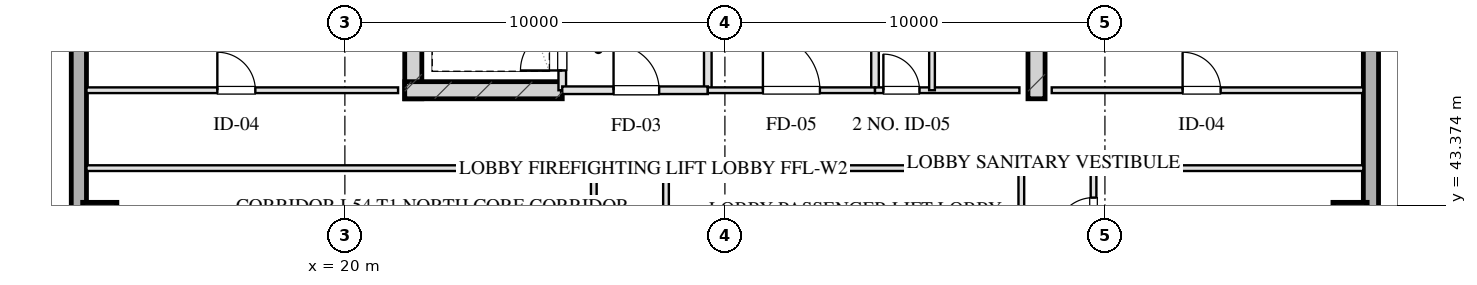
"""IFC4 building model, lengths in metres.
Left out: names, types, materials, properties, quantities, classifications, styles, units other than length and angle.
Written with IfcOpenShell. Run it as: python <this file> out.ifc"""

import sys

from ifc_helpers import new_model, si_unit, direction, frame, frame_2d, origin, origin_2d, place, context, subcontext, project, spatial, rectangle, hollow_rectangle, extrude, element, fill, save


model = new_model("IFC4")
c1 = context("Model", 3, precision=1e-05, world=origin(), true_north=direction((0.0, 1.0)))
c2 = subcontext(c1, "Body", "Model", "MODEL_VIEW")
j1 = project(units=[si_unit("LENGTHUNIT", "METRE"), si_unit("PLANEANGLEUNIT", "RADIAN")], contexts=[c1])
p1 = place(None, origin())
s1 = spatial("IfcSite", under=j1, at=p1, CompositionType="ELEMENT")
p2 = place(p1, origin())
s2 = spatial("IfcBuilding", under=s1, at=p2, CompositionType="ELEMENT")
p3 = place(p2, frame((0.0, 0.0, 202.4)))
s3 = spatial("IfcBuildingStorey", under=s2, at=p3, CompositionType="ELEMENT", Elevation=202.4)
for number, where, z_axis, x_axis in (
    (1, (21.8, 46.175, 0.0), (0.0, 0.0, 1.0), (0.0, 1.0, 0.0)),
    (2, (38.2, 46.175, 0.0), (0.0, 0.0, 1.0), (0.0, 1.0, 0.0)),
):
    element("IfcWall", number, at=place(p3, frame(where, z_axis=z_axis, x_axis=x_axis)), inside=s3, PredefinedType="SHEAR", context=c2, shape_type="SweptSolid", body=[
        extrude(rectangle(XDim=9.33, YDim=0.45, at=frame_2d((4.665, 0.0))), origin(), (0.0, 0.0, 1.0), 3.45),
    ])
p4 = place(p3, frame((21.575, 46.4, 0.0), z_axis=(0.0, 0.0, 1.0), x_axis=(1.0, 0.0, 0.0)))
e3 = element("IfcWall", 3, at=p4, inside=s3, PredefinedType="SHEAR", context=c2, shape_type="SweptSolid", body=[
    extrude(rectangle(XDim=4.145, YDim=0.45, at=frame_2d((2.073, 0.0))), origin(), (0.0, 0.0, 1.0), 3.45),
])
for number, where, z_axis, x_axis in (
    (4, (13.55, 43.0, 0.0), (0.0, 0.0, 1.0), (1.0, 0.0, 0.0)),
    (5, (46.45, 43.0, 0.0), (0.0, 0.0, 1.0), (1.0, 0.0, 0.0)),
):
    element("IfcColumn", number, at=place(p3, frame(where, z_axis=z_axis, x_axis=x_axis)), inside=s3, PredefinedType="COLUMN", context=c2, shape_type="SweptSolid", body=[
        extrude(hollow_rectangle(XDim=0.9, YDim=0.9, WallThickness=0.032, at=origin_2d()), origin(), (0.0, 0.0, 1.0), 3.451),
    ])
p5 = place(p3, frame((13.0, 10.8, 0.0), z_axis=(0.0, 0.0, 1.0), x_axis=(0.0, 1.0, 0.0)))
e6 = element("IfcWall", 6, at=p5, inside=s3, PredefinedType="SOLIDWALL", context=c2, shape_type="SweptSolid", body=[
    extrude(rectangle(XDim=46.4, YDim=0.4, at=frame_2d((23.2, 0.0))), origin(), (0.0, 0.0, 1.0), 2.61),
])
p6 = place(p5, frame((15.75, 0.0, 0.75)))
e7 = element("IfcOpeningElement", 7, at=p6, cuts=e6, PredefinedType="OPENING", context=c2, shape_type="SweptSolid", body=[
    extrude(rectangle(XDim=2.1, YDim=1.46, at=frame_2d((1.05, 0.73))), frame((0.0, 0.21, 0.0), z_axis=(0.0, -1.0, 0.0), x_axis=(1.0, 0.0, 0.0)), (0.0, 0.0, 1.0), 0.42),
])
p7 = place(p5, frame((19.55, 0.0, 0.75)))
e8 = element("IfcOpeningElement", 8, at=p7, cuts=e6, PredefinedType="OPENING", context=c2, shape_type="SweptSolid", body=[
    extrude(rectangle(XDim=2.1, YDim=1.46, at=frame_2d((1.05, 0.73))), frame((0.0, 0.21, 0.0), z_axis=(0.0, -1.0, 0.0), x_axis=(1.0, 0.0, 0.0)), (0.0, 0.0, 1.0), 0.42),
])
p8 = place(p5, frame((24.75, 0.0, 0.75)))
e9 = element("IfcOpeningElement", 9, at=p8, cuts=e6, PredefinedType="OPENING", context=c2, shape_type="SweptSolid", body=[
    extrude(rectangle(XDim=2.1, YDim=1.46, at=frame_2d((1.05, 0.73))), frame((0.0, 0.21, 0.0), z_axis=(0.0, -1.0, 0.0), x_axis=(1.0, 0.0, 0.0)), (0.0, 0.0, 1.0), 0.42),
])
p9 = place(p5, frame((28.55, 0.0, 0.75)))
e10 = element("IfcOpeningElement", 10, at=p9, cuts=e6, PredefinedType="OPENING", context=c2, shape_type="SweptSolid", body=[
    extrude(rectangle(XDim=2.1, YDim=1.46, at=frame_2d((1.05, 0.73))), frame((0.0, 0.21, 0.0), z_axis=(0.0, -1.0, 0.0), x_axis=(1.0, 0.0, 0.0)), (0.0, 0.0, 1.0), 0.42),
])
p10 = place(p3, frame((47.0, 57.2, 0.0), z_axis=(0.0, 0.0, 1.0), x_axis=(0.0, -1.0, 0.0)))
e11 = element("IfcWall", 11, at=p10, inside=s3, PredefinedType="SOLIDWALL", context=c2, shape_type="SweptSolid", body=[
    extrude(rectangle(XDim=46.4, YDim=0.4, at=frame_2d((23.2, 0.0))), origin(), (0.0, 0.0, 1.0), 2.61),
])
p11 = place(p10, frame((28.55, 0.0, 0.75)))
e12 = element("IfcOpeningElement", 12, at=p11, cuts=e11, PredefinedType="OPENING", context=c2, shape_type="SweptSolid", body=[
    extrude(rectangle(XDim=2.1, YDim=1.46, at=frame_2d((1.05, 0.73))), frame((0.0, 0.21, 0.0), z_axis=(0.0, -1.0, 0.0), x_axis=(1.0, 0.0, 0.0)), (0.0, 0.0, 1.0), 0.42),
])
p12 = place(p10, frame((24.75, 0.0, 0.75)))
e13 = element("IfcOpeningElement", 13, at=p12, cuts=e11, PredefinedType="OPENING", context=c2, shape_type="SweptSolid", body=[
    extrude(rectangle(XDim=2.1, YDim=1.46, at=frame_2d((1.05, 0.73))), frame((0.0, 0.21, 0.0), z_axis=(0.0, -1.0, 0.0), x_axis=(1.0, 0.0, 0.0)), (0.0, 0.0, 1.0), 0.42),
])
p13 = place(p10, frame((19.55, 0.0, 0.75)))
e14 = element("IfcOpeningElement", 14, at=p13, cuts=e11, PredefinedType="OPENING", context=c2, shape_type="SweptSolid", body=[
    extrude(rectangle(XDim=2.1, YDim=1.46, at=frame_2d((1.05, 0.73))), frame((0.0, 0.21, 0.0), z_axis=(0.0, -1.0, 0.0), x_axis=(1.0, 0.0, 0.0)), (0.0, 0.0, 1.0), 0.42),
])
p14 = place(p10, frame((15.75, 0.0, 0.75)))
e15 = element("IfcOpeningElement", 15, at=p14, cuts=e11, PredefinedType="OPENING", context=c2, shape_type="SweptSolid", body=[
    extrude(rectangle(XDim=2.1, YDim=1.46, at=frame_2d((1.05, 0.73))), frame((0.0, 0.21, 0.0), z_axis=(0.0, -1.0, 0.0), x_axis=(1.0, 0.0, 0.0)), (0.0, 0.0, 1.0), 0.42),
])
p15 = place(p3, frame((25.72, 46.4, 0.0), z_axis=(0.0, 0.0, 1.0), x_axis=(0.0, 1.0, 0.0)))
e16 = element("IfcWall", 16, at=p15, inside=s3, PredefinedType="PARTITIONING", context=c2, shape_type="SweptSolid", body=[
    extrude(rectangle(XDim=1.9, YDim=0.2, at=frame_2d((0.95, 0.0))), origin(), (0.0, 0.0, 1.0), 3.175),
])
p16 = place(p15, frame((0.52, 0.0, 0.0)))
e17 = element("IfcOpeningElement", 17, at=p16, cuts=e16, PredefinedType="OPENING", context=c2, shape_type="SweptSolid", body=[
    extrude(rectangle(XDim=1.1, YDim=2.05, at=frame_2d((0.55, 1.025))), frame((0.0, 0.11, 0.0), z_axis=(0.0, -1.0, 0.0), x_axis=(1.0, 0.0, 0.0)), (0.0, 0.0, 1.0), 0.22),
])
p17 = place(p3, frame((29.55, 46.4, 0.0), z_axis=(0.0, 0.0, 1.0), x_axis=(0.0, 1.0, 0.0)))
e18 = element("IfcWall", 18, at=p17, inside=s3, PredefinedType="PARTITIONING", context=c2, shape_type="SweptSolid", body=[
    extrude(rectangle(XDim=8.43, YDim=0.2, at=frame_2d((4.215, 0.0))), origin(), (0.0, 0.0, 1.0), 3.175),
])
p18 = place(p3, frame((25.72, 46.4, 0.0), z_axis=(0.0, 0.0, 1.0), x_axis=(1.0, 0.0, 0.0)))
e19 = element("IfcWall", 19, at=p18, inside=s3, PredefinedType="PARTITIONING", context=c2, shape_type="SweptSolid", body=[
    extrude(rectangle(XDim=3.83, YDim=0.2, at=frame_2d((1.915, 0.0))), origin(), (0.0, 0.0, 1.0), 3.175),
])
p19 = place(p18, frame((1.35, 0.0, 0.0)))
e20 = element("IfcOpeningElement", 20, at=p19, cuts=e19, PredefinedType="OPENING", context=c2, shape_type="SweptSolid", body=[
    extrude(rectangle(XDim=1.2, YDim=2.05, at=frame_2d((0.6, 1.025))), frame((0.0, 0.11, 0.0), z_axis=(0.0, -1.0, 0.0), x_axis=(1.0, 0.0, 0.0)), (0.0, 0.0, 1.0), 0.22),
])
p20 = place(p3, frame((33.95, 46.4, 0.0), z_axis=(0.0, 0.0, 1.0), x_axis=(0.0, 1.0, 0.0)))
e21 = element("IfcWall", 21, at=p20, inside=s3, PredefinedType="PARTITIONING", context=c2, shape_type="SweptSolid", body=[
    extrude(rectangle(XDim=8.43, YDim=0.2, at=frame_2d((4.215, 0.0))), origin(), (0.0, 0.0, 1.0), 3.175),
])
p21 = place(p3, frame((29.55, 46.4, 0.0), z_axis=(0.0, 0.0, 1.0), x_axis=(1.0, 0.0, 0.0)))
e22 = element("IfcWall", 22, at=p21, inside=s3, PredefinedType="PARTITIONING", context=c2, shape_type="SweptSolid", body=[
    extrude(rectangle(XDim=4.4, YDim=0.15, at=frame_2d((2.2, 0.0))), origin(), (0.0, 0.0, 1.0), 3.175),
])
p22 = place(p21, frame((1.45, 0.0, 0.0)))
e23 = element("IfcOpeningElement", 23, at=p22, cuts=e22, PredefinedType="OPENING", context=c2, shape_type="SweptSolid", body=[
    extrude(rectangle(XDim=1.5, YDim=2.05, at=frame_2d((0.75, 1.025))), frame((0.0, 0.085, 0.0), z_axis=(0.0, -1.0, 0.0), x_axis=(1.0, 0.0, 0.0)), (0.0, 0.0, 1.0), 0.17),
])
p23 = place(p3, frame((33.95, 46.4, 0.0), z_axis=(0.0, 0.0, 1.0), x_axis=(1.0, 0.0, 0.0)))
e24 = element("IfcWall", 24, at=p23, inside=s3, PredefinedType="PARTITIONING", context=c2, shape_type="SweptSolid", body=[
    extrude(rectangle(XDim=3.8, YDim=0.15, at=frame_2d((1.9, 0.0))), origin(), (0.0, 0.0, 1.0), 3.175),
])
p24 = place(p23, frame((0.22, 0.0, 0.0)))
e25 = element("IfcOpeningElement", 25, at=p24, cuts=e24, PredefinedType="OPENING", context=c2, shape_type="SweptSolid", body=[
    extrude(rectangle(XDim=0.95, YDim=2.05, at=frame_2d((0.475, 1.025))), frame((0.0, 0.085, 0.0), z_axis=(0.0, -1.0, 0.0), x_axis=(1.0, 0.0, 0.0)), (0.0, 0.0, 1.0), 0.17),
])
p25 = place(p3, frame((35.45, 46.4, 0.0), z_axis=(0.0, 0.0, 1.0), x_axis=(0.0, 1.0, 0.0)))
e26 = element("IfcWall", 26, at=p25, inside=s3, PredefinedType="PARTITIONING", context=c2, shape_type="SweptSolid", body=[
    extrude(rectangle(XDim=8.43, YDim=0.15, at=frame_2d((4.215, 0.0))), origin(), (0.0, 0.0, 1.0), 2.765),
])
p26 = place(p25, frame((2.55, 0.0, 0.0)))
e27 = element("IfcOpeningElement", 27, at=p26, cuts=e26, PredefinedType="OPENING", context=c2, shape_type="SweptSolid", body=[
    extrude(rectangle(XDim=0.95, YDim=2.05, at=frame_2d((0.475, 1.025))), frame((0.0, 0.085, 0.0), z_axis=(0.0, -1.0, 0.0), x_axis=(1.0, 0.0, 0.0)), (0.0, 0.0, 1.0), 0.17),
])
p27 = place(p25, frame((4.7, 0.0, 0.0)))
e28 = element("IfcOpeningElement", 28, at=p27, cuts=e26, PredefinedType="OPENING", context=c2, shape_type="SweptSolid", body=[
    extrude(rectangle(XDim=0.9, YDim=2.05, at=frame_2d((0.45, 1.025))), frame((0.0, 0.085, 0.0), z_axis=(0.0, -1.0, 0.0), x_axis=(1.0, 0.0, 0.0)), (0.0, 0.0, 1.0), 0.17),
])
p28 = place(p25, frame((6.8, 0.0, 0.0)))
e29 = element("IfcOpeningElement", 29, at=p28, cuts=e26, PredefinedType="OPENING", context=c2, shape_type="SweptSolid", body=[
    extrude(rectangle(XDim=0.9, YDim=2.05, at=frame_2d((0.45, 1.025))), frame((0.0, 0.085, 0.0), z_axis=(0.0, -1.0, 0.0), x_axis=(1.0, 0.0, 0.0)), (0.0, 0.0, 1.0), 0.17),
])
p29 = place(p3, frame((13.2, 46.4, 0.0), z_axis=(0.0, 0.0, 1.0), x_axis=(1.0, 0.0, 0.0)))
e30 = element("IfcWall", 30, at=p29, inside=s3, PredefinedType="PARTITIONING", context=c2, shape_type="SweptSolid", body=[
    extrude(rectangle(XDim=8.2, YDim=0.15, at=frame_2d((4.1, 0.0))), origin(), (0.0, 0.0, 1.0), 3.175),
])
p30 = place(p29, frame((3.444, 0.0, 0.0)))
e31 = element("IfcOpeningElement", 31, at=p30, cuts=e30, PredefinedType="OPENING", context=c2, shape_type="SweptSolid", body=[
    extrude(rectangle(XDim=1.0, YDim=2.05, at=frame_2d((0.5, 1.025))), frame((0.0, 0.085, 0.0), z_axis=(0.0, -1.0, 0.0), x_axis=(1.0, 0.0, 0.0)), (0.0, 0.0, 1.0), 0.17),
])
p31 = place(p3, frame((38.6, 46.4, 0.0), z_axis=(0.0, 0.0, 1.0), x_axis=(1.0, 0.0, 0.0)))
e32 = element("IfcWall", 32, at=p31, inside=s3, PredefinedType="PARTITIONING", context=c2, shape_type="SweptSolid", body=[
    extrude(rectangle(XDim=8.2, YDim=0.15, at=frame_2d((4.1, 0.0))), origin(), (0.0, 0.0, 1.0), 3.175),
])
p32 = place(p31, frame((3.444, 0.0, 0.0)))
e33 = element("IfcOpeningElement", 33, at=p32, cuts=e32, PredefinedType="OPENING", context=c2, shape_type="SweptSolid", body=[
    extrude(rectangle(XDim=1.0, YDim=2.05, at=frame_2d((0.5, 1.025))), frame((0.0, 0.085, 0.0), z_axis=(0.0, -1.0, 0.0), x_axis=(1.0, 0.0, 0.0)), (0.0, 0.0, 1.0), 0.17),
])
p33 = place(p3, frame((13.2, 44.35, 0.0), z_axis=(0.0, 0.0, 1.0), x_axis=(1.0, 0.0, 0.0)))
e34 = element("IfcWall", 34, at=p33, inside=s3, PredefinedType="PARTITIONING", context=c2, shape_type="SweptSolid", body=[
    extrude(rectangle(XDim=13.35, YDim=0.15, at=frame_2d((6.675, 0.0))), origin(), (0.0, 0.0, 1.0), 3.175),
])
p34 = place(p3, frame((28.45, 44.35, 0.0), z_axis=(0.0, 0.0, 1.0), x_axis=(1.0, 0.0, 0.0)))
e35 = element("IfcWall", 35, at=p34, inside=s3, PredefinedType="PARTITIONING", context=c2, shape_type="SweptSolid", body=[
    extrude(rectangle(XDim=9.35, YDim=0.15, at=frame_2d((4.675, 0.0))), origin(), (0.0, 0.0, 1.0), 3.175),
])
p35 = place(p3, frame((39.7, 44.35, 0.0), z_axis=(0.0, 0.0, 1.0), x_axis=(1.0, 0.0, 0.0)))
e36 = element("IfcWall", 36, at=p35, inside=s3, PredefinedType="PARTITIONING", context=c2, shape_type="SweptSolid", body=[
    extrude(rectangle(XDim=7.1, YDim=0.15, at=frame_2d((3.55, 0.0))), origin(), (0.0, 0.0, 1.0), 3.175),
])
p36 = place(p3, frame((26.55, 23.65, 0.0), z_axis=(0.0, 0.0, 1.0), x_axis=(0.0, 1.0, 0.0)))
e37 = element("IfcWall", 37, at=p36, inside=s3, PredefinedType="PARTITIONING", context=c2, shape_type="SweptSolid", body=[
    extrude(rectangle(XDim=20.7, YDim=0.15, at=frame_2d((10.35, 0.0))), origin(), (0.0, 0.0, 1.0), 3.175),
])
p37 = place(p36, frame((4.075, 0.0, 0.0)))
e38 = element("IfcOpeningElement", 38, at=p37, cuts=e37, PredefinedType="OPENING", context=c2, shape_type="SweptSolid", body=[
    extrude(rectangle(XDim=1.0, YDim=2.05, at=frame_2d((0.5, 1.025))), frame((0.0, 0.085, 0.0), z_axis=(0.0, -1.0, 0.0), x_axis=(1.0, 0.0, 0.0)), (0.0, 0.0, 1.0), 0.17),
])
p38 = place(p36, frame((14.425, 0.0, 0.0)))
e39 = element("IfcOpeningElement", 39, at=p38, cuts=e37, PredefinedType="OPENING", context=c2, shape_type="SweptSolid", body=[
    extrude(rectangle(XDim=1.0, YDim=2.05, at=frame_2d((0.5, 1.025))), frame((0.0, 0.085, 0.0), z_axis=(0.0, -1.0, 0.0), x_axis=(1.0, 0.0, 0.0)), (0.0, 0.0, 1.0), 0.17),
])
p39 = place(p3, frame((28.45, 23.65, 0.0), z_axis=(0.0, 0.0, 1.0), x_axis=(0.0, 1.0, 0.0)))
e40 = element("IfcWall", 40, at=p39, inside=s3, PredefinedType="PARTITIONING", context=c2, shape_type="SweptSolid", body=[
    extrude(rectangle(XDim=20.7, YDim=0.15, at=frame_2d((10.35, 0.0))), origin(), (0.0, 0.0, 1.0), 3.175),
])
p40 = place(p39, frame((9.936, 0.0, 0.0)))
e41 = element("IfcOpeningElement", 41, at=p40, cuts=e40, PredefinedType="OPENING", context=c2, shape_type="SweptSolid", body=[
    extrude(rectangle(XDim=1.1, YDim=2.05, at=frame_2d((0.55, 1.025))), frame((0.0, 0.085, 0.0), z_axis=(0.0, -1.0, 0.0), x_axis=(1.0, 0.0, 0.0)), (0.0, 0.0, 1.0), 0.17),
])
p41 = place(p3, frame((37.8, 23.65, 0.0), z_axis=(0.0, 0.0, 1.0), x_axis=(0.0, 1.0, 0.0)))
e42 = element("IfcWall", 42, at=p41, inside=s3, PredefinedType="PARTITIONING", context=c2, shape_type="SweptSolid", body=[
    extrude(rectangle(XDim=20.7, YDim=0.15, at=frame_2d((10.35, 0.0))), origin(), (0.0, 0.0, 1.0), 3.175),
])
p42 = place(p3, frame((39.7, 23.65, 0.0), z_axis=(0.0, 0.0, 1.0), x_axis=(0.0, 1.0, 0.0)))
e43 = element("IfcWall", 43, at=p42, inside=s3, PredefinedType="PARTITIONING", context=c2, shape_type="SweptSolid", body=[
    extrude(rectangle(XDim=20.7, YDim=0.15, at=frame_2d((10.35, 0.0))), origin(), (0.0, 0.0, 1.0), 3.175),
])
p43 = place(p42, frame((0.775, 0.0, 0.0)))
e44 = element("IfcOpeningElement", 44, at=p43, cuts=e43, PredefinedType="OPENING", context=c2, shape_type="SweptSolid", body=[
    extrude(rectangle(XDim=1.0, YDim=2.05, at=frame_2d((0.5, 1.025))), frame((0.0, 0.085, 0.0), z_axis=(0.0, -1.0, 0.0), x_axis=(1.0, 0.0, 0.0)), (0.0, 0.0, 1.0), 0.17),
])
p44 = place(p42, frame((3.95, 0.0, 0.0)))
e45 = element("IfcOpeningElement", 45, at=p44, cuts=e43, PredefinedType="OPENING", context=c2, shape_type="SweptSolid", body=[
    extrude(rectangle(XDim=1.05, YDim=2.05, at=frame_2d((0.525, 1.025))), frame((0.0, 0.085, 0.0), z_axis=(0.0, -1.0, 0.0), x_axis=(1.0, 0.0, 0.0)), (0.0, 0.0, 1.0), 0.17),
])
p45 = place(p42, frame((8.19, 0.0, 0.0)))
e46 = element("IfcOpeningElement", 46, at=p45, cuts=e43, PredefinedType="OPENING", context=c2, shape_type="SweptSolid", body=[
    extrude(rectangle(XDim=1.0, YDim=2.05, at=frame_2d((0.5, 1.025))), frame((0.0, 0.085, 0.0), z_axis=(0.0, -1.0, 0.0), x_axis=(1.0, 0.0, 0.0)), (0.0, 0.0, 1.0), 0.17),
])
p46 = place(p42, frame((12.373, 0.0, 0.0)))
e47 = element("IfcOpeningElement", 47, at=p46, cuts=e43, PredefinedType="OPENING", context=c2, shape_type="SweptSolid", body=[
    extrude(rectangle(XDim=1.0, YDim=2.05, at=frame_2d((0.5, 1.025))), frame((0.0, 0.085, 0.0), z_axis=(0.0, -1.0, 0.0), x_axis=(1.0, 0.0, 0.0)), (0.0, 0.0, 1.0), 0.17),
])
p47 = place(p42, frame((15.933, 0.0, 0.0)))
e48 = element("IfcOpeningElement", 48, at=p47, cuts=e43, PredefinedType="OPENING", context=c2, shape_type="SweptSolid", body=[
    extrude(rectangle(XDim=1.0, YDim=2.05, at=frame_2d((0.5, 1.025))), frame((0.0, 0.085, 0.0), z_axis=(0.0, -1.0, 0.0), x_axis=(1.0, 0.0, 0.0)), (0.0, 0.0, 1.0), 0.17),
])
p48 = place(p42, frame((18.925, 0.0, 0.0)))
e49 = element("IfcOpeningElement", 49, at=p48, cuts=e43, PredefinedType="OPENING", context=c2, shape_type="SweptSolid", body=[
    extrude(rectangle(XDim=1.0, YDim=2.05, at=frame_2d((0.5, 1.025))), frame((0.0, 0.085, 0.0), z_axis=(0.0, -1.0, 0.0), x_axis=(1.0, 0.0, 0.0)), (0.0, 0.0, 1.0), 0.17),
])
p49 = place(p16, origin())
e50 = element("IfcDoor", 50, at=p49, inside=s3, OperationType="SINGLE_SWING_LEFT", PredefinedType="DOOR", context=c2, shape_type="SweptSolid", body=[
    extrude(rectangle(XDim=1.1, YDim=2.05, at=frame_2d((0.55, 1.025))), frame((0.0, 0.025, 0.0), z_axis=(0.0, -1.0, 0.0), x_axis=(1.0, 0.0, 0.0)), (0.0, 0.0, 1.0), 0.05),
])
fill(e17, e50)
p50 = place(p19, origin())
e51 = element("IfcDoor", 51, at=p50, inside=s3, OperationType="SINGLE_SWING_LEFT", PredefinedType="DOOR", context=c2, shape_type="SweptSolid", body=[
    extrude(rectangle(XDim=1.2, YDim=2.05, at=frame_2d((0.6, 1.025))), frame((0.0, 0.025, 0.0), z_axis=(0.0, -1.0, 0.0), x_axis=(1.0, 0.0, 0.0)), (0.0, 0.0, 1.0), 0.05),
])
fill(e20, e51)
p51 = place(p22, origin())
e52 = element("IfcDoor", 52, at=p51, inside=s3, OperationType="SINGLE_SWING_LEFT", PredefinedType="DOOR", context=c2, shape_type="SweptSolid", body=[
    extrude(rectangle(XDim=1.5, YDim=2.05, at=frame_2d((0.75, 1.025))), frame((0.0, 0.025, 0.0), z_axis=(0.0, -1.0, 0.0), x_axis=(1.0, 0.0, 0.0)), (0.0, 0.0, 1.0), 0.05),
])
fill(e23, e52)
p52 = place(p24, origin())
e53 = element("IfcDoor", 53, at=p52, inside=s3, OperationType="SINGLE_SWING_LEFT", PredefinedType="DOOR", context=c2, shape_type="SweptSolid", body=[
    extrude(rectangle(XDim=0.95, YDim=2.05, at=frame_2d((0.475, 1.025))), frame((0.0, 0.025, 0.0), z_axis=(0.0, -1.0, 0.0), x_axis=(1.0, 0.0, 0.0)), (0.0, 0.0, 1.0), 0.05),
])
fill(e25, e53)
p53 = place(p30, origin())
e54 = element("IfcDoor", 54, at=p53, inside=s3, OperationType="SINGLE_SWING_LEFT", PredefinedType="DOOR", context=c2, shape_type="SweptSolid", body=[
    extrude(rectangle(XDim=1.0, YDim=2.05, at=frame_2d((0.5, 1.025))), frame((0.0, 0.025, 0.0), z_axis=(0.0, -1.0, 0.0), x_axis=(1.0, 0.0, 0.0)), (0.0, 0.0, 1.0), 0.05),
])
fill(e31, e54)
p54 = place(p32, origin())
e55 = element("IfcDoor", 55, at=p54, inside=s3, OperationType="SINGLE_SWING_LEFT", PredefinedType="DOOR", context=c2, shape_type="SweptSolid", body=[
    extrude(rectangle(XDim=1.0, YDim=2.05, at=frame_2d((0.5, 1.025))), frame((0.0, 0.025, 0.0), z_axis=(0.0, -1.0, 0.0), x_axis=(1.0, 0.0, 0.0)), (0.0, 0.0, 1.0), 0.05),
])
fill(e33, e55)
p55 = place(p48, origin())
e56 = element("IfcDoor", 56, at=p55, inside=s3, OperationType="SINGLE_SWING_LEFT", PredefinedType="DOOR", context=c2, shape_type="SweptSolid", body=[
    extrude(rectangle(XDim=1.0, YDim=2.05, at=frame_2d((0.5, 1.025))), frame((0.0, 0.025, 0.0), z_axis=(0.0, -1.0, 0.0), x_axis=(1.0, 0.0, 0.0)), (0.0, 0.0, 1.0), 0.05),
])
fill(e49, e56)
save(model, sys.argv[1])
